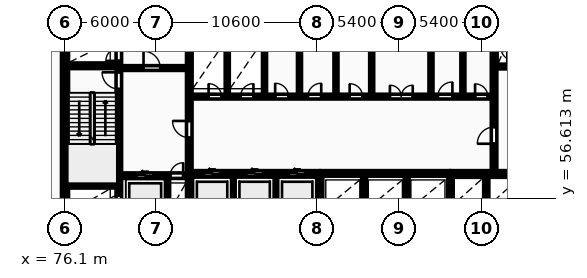
"""IFC4 building model, lengths in metres.
Left out: names, types, materials, properties, quantities, classifications, styles, units other than length and angle.
Written with IfcOpenShell. Run it as: python <this file> out.ifc"""

import sys

from ifc_helpers import new_model, si_unit, direction, frame, frame_2d, origin, place, context, subcontext, project, spatial, rectangle, extrude, element, fill, save


model = new_model("IFC4")
c1 = context("Model", 3, precision=1e-05, world=origin(), true_north=direction((0.0, 1.0)))
c2 = subcontext(c1, "Body", "Model", "MODEL_VIEW")
j1 = project(units=[si_unit("LENGTHUNIT", "METRE"), si_unit("PLANEANGLEUNIT", "RADIAN")], contexts=[c1])
p1 = place(None, origin())
s1 = spatial("IfcSite", under=j1, at=p1, CompositionType="ELEMENT")
p2 = place(p1, origin())
s2 = spatial("IfcBuilding", under=s1, at=p2, CompositionType="ELEMENT")
p3 = place(p2, frame((0.0, 0.0, 5.4)))
s3 = spatial("IfcBuildingStorey", under=s2, at=p3, CompositionType="ELEMENT", Elevation=5.4)
p4 = place(p3, frame((76.125, 55.375, 0.0), z_axis=(0.0, 0.0, 1.0), x_axis=(0.0, 1.0, 0.0)))
e1 = element("IfcWall", 1, at=p4, inside=s3, PredefinedType="SHEAR", context=c2, shape_type="SweptSolid", body=[
    extrude(rectangle(XDim=11.65, YDim=0.35, at=frame_2d((5.825, 0.0))), origin(), (0.0, 0.0, 1.0), 4.6),
])
p5 = place(p3, frame((79.665, 55.4, 0.0), z_axis=(0.0, 0.0, 1.0), x_axis=(0.0, 1.0, 0.0)))
e2 = element("IfcWall", 2, at=p5, inside=s3, PredefinedType="SHEAR", context=c2, shape_type="SweptSolid", body=[
    extrude(rectangle(XDim=11.6, YDim=0.25, at=frame_2d((5.8, 0.0))), origin(), (0.0, 0.0, 1.0), 4.6),
])
p6 = place(p5, frame((0.55, 0.0, 0.0)))
e3 = element("IfcOpeningElement", 3, at=p6, cuts=e2, PredefinedType="OPENING", context=c2, shape_type="SweptSolid", body=[
    extrude(rectangle(XDim=0.85, YDim=2.05, at=frame_2d((0.425, 1.025))), frame((0.0, 0.135, 0.0), z_axis=(0.0, -1.0, 0.0), x_axis=(1.0, 0.0, 0.0)), (0.0, 0.0, 1.0), 0.27),
])
p7 = place(p5, frame((8.4, 0.0, 0.0)))
e4 = element("IfcOpeningElement", 4, at=p7, cuts=e2, PredefinedType="OPENING", context=c2, shape_type="SweptSolid", body=[
    extrude(rectangle(XDim=1.1, YDim=2.1, at=frame_2d((0.55, 1.05))), frame((0.0, 0.135, 0.0), z_axis=(0.0, -1.0, 0.0), x_axis=(1.0, 0.0, 0.0)), (0.0, 0.0, 1.0), 0.27),
])
p8 = place(p5, frame((10.25, 0.0, 0.0)))
e5 = element("IfcOpeningElement", 5, at=p8, cuts=e2, PredefinedType="OPENING", context=c2, shape_type="SweptSolid", body=[
    extrude(rectangle(XDim=0.85, YDim=2.05, at=frame_2d((0.425, 1.025))), frame((0.0, 0.135, 0.0), z_axis=(0.0, -1.0, 0.0), x_axis=(1.0, 0.0, 0.0)), (0.0, 0.0, 1.0), 0.27),
])
for number, where, z_axis, x_axis in (
    (6, (76.3, 57.475, 0.0), (0.0, 0.0, 1.0), (1.0, 0.0, 0.0)),
    (7, (76.3, 65.325, 0.0), (0.0, 0.0, 1.0), (1.0, 0.0, 0.0)),
):
    element("IfcWall", number, at=place(p3, frame(where, z_axis=z_axis, x_axis=x_axis)), inside=s3, PredefinedType="SHEAR", context=c2, shape_type="SweptSolid", body=[
        extrude(rectangle(XDim=3.24, YDim=0.25, at=frame_2d((1.62, 0.0))), origin(), (0.0, 0.0, 1.0), 4.6),
    ])
p9 = place(p3, frame((79.79, 58.1, 0.0), z_axis=(0.0, 0.0, 1.0), x_axis=(1.0, 0.0, 0.0)))
e8 = element("IfcWall", 8, at=p9, inside=s3, PredefinedType="SHEAR", context=c2, shape_type="SweptSolid", body=[
    extrude(rectangle(XDim=4.39, YDim=0.25, at=frame_2d((2.195, 0.0))), origin(), (0.0, 0.0, 1.0), 4.6),
])
p10 = place(p9, frame((1.05, 0.0, 0.0)))
e9 = element("IfcOpeningElement", 9, at=p10, cuts=e8, PredefinedType="OPENING", context=c2, shape_type="SweptSolid", body=[
    extrude(rectangle(XDim=1.12, YDim=2.12, at=frame_2d((0.56, 1.06))), frame((0.0, 0.135, 0.0), z_axis=(0.0, -1.0, 0.0), x_axis=(1.0, 0.0, 0.0)), (0.0, 0.0, 1.0), 0.27),
])
p11 = place(p9, frame((3.26, 0.0, 0.0)))
e10 = element("IfcOpeningElement", 10, at=p11, cuts=e8, PredefinedType="OPENING", context=c2, shape_type="SweptSolid", body=[
    extrude(rectangle(XDim=0.85, YDim=2.05, at=frame_2d((0.425, 1.025))), frame((0.0, 0.135, 0.0), z_axis=(0.0, -1.0, 0.0), x_axis=(1.0, 0.0, 0.0)), (0.0, 0.0, 1.0), 0.27),
])
p12 = place(p3, frame((82.85, 55.4, 0.0), z_axis=(0.0, 0.0, 1.0), x_axis=(0.0, 1.0, 0.0)))
e11 = element("IfcWall", 11, at=p12, inside=s3, PredefinedType="PARTITIONING", context=c2, shape_type="SweptSolid", body=[
    extrude(rectangle(XDim=2.56, YDim=0.2, at=frame_2d((1.28, 0.0))), origin(), (0.0, 0.0, 1.0), 4.3),
])
p13 = place(p3, frame((79.79, 65.18, 0.0), z_axis=(0.0, 0.0, 1.0), x_axis=(1.0, 0.0, 0.0)))
e12 = element("IfcWall", 12, at=p13, inside=s3, PredefinedType="PARTITIONING", context=c2, shape_type="SweptSolid", body=[
    extrude(rectangle(XDim=4.39, YDim=0.2, at=frame_2d((2.195, 0.0))), origin(), (0.0, 0.0, 1.0), 4.3),
])
p14 = place(p13, frame((1.5, 0.0, 0.0)))
e13 = element("IfcOpeningElement", 13, at=p14, cuts=e12, PredefinedType="OPENING", context=c2, shape_type="SweptSolid", body=[
    extrude(rectangle(XDim=1.1, YDim=2.1, at=frame_2d((0.55, 1.05))), frame((0.0, 0.11, 0.0), z_axis=(0.0, -1.0, 0.0), x_axis=(1.0, 0.0, 0.0)), (0.0, 0.0, 1.0), 0.22),
])
p15 = place(p3, frame((84.3, 55.4, 0.0), z_axis=(0.0, 0.0, 1.0), x_axis=(0.0, 1.0, 0.0)))
e14 = element("IfcWall", 14, at=p15, inside=s3, PredefinedType="SHEAR", context=c2, shape_type="SweptSolid", body=[
    extrude(rectangle(XDim=11.6, YDim=0.25, at=frame_2d((5.8, 0.0))), origin(), (0.0, 0.0, 1.0), 4.6),
])
p16 = place(p15, frame((5.2, 0.0, 0.0)))
e15 = element("IfcOpeningElement", 15, at=p16, cuts=e14, PredefinedType="OPENING", context=c2, shape_type="SweptSolid", body=[
    extrude(rectangle(XDim=1.1, YDim=2.1, at=frame_2d((0.55, 1.05))), frame((0.0, 0.135, 0.0), z_axis=(0.0, -1.0, 0.0), x_axis=(1.0, 0.0, 0.0)), (0.0, 0.0, 1.0), 0.27),
])
for number, where, z_axis, x_axis in (
    (16, (87.2, 55.4, 0.0), (0.0, 0.0, 1.0), (0.0, 1.0, 0.0)),
    (17, (90.0, 55.4, 0.0), (0.0, 0.0, 1.0), (0.0, 1.0, 0.0)),
):
    element("IfcWall", number, at=place(p3, frame(where, z_axis=z_axis, x_axis=x_axis)), inside=s3, PredefinedType="PARTITIONING", context=c2, shape_type="SweptSolid", body=[
        extrude(rectangle(XDim=2.72, YDim=0.2, at=frame_2d((1.36, 0.0))), origin(), (0.0, 0.0, 1.0), 4.3),
    ])
p17 = place(p3, frame((84.42, 58.25, 0.0), z_axis=(0.0, 0.0, 1.0), x_axis=(1.0, 0.0, 0.0)))
e18 = element("IfcWall", 18, at=p17, inside=s3, PredefinedType="SHEAR", context=c2, shape_type="SweptSolid", body=[
    extrude(rectangle(XDim=8.36, YDim=0.25, at=frame_2d((4.18, 0.0))), origin(), (0.0, 0.0, 1.0), 4.6),
])
p18 = place(p17, frame((0.82, 0.0, 0.0)))
e19 = element("IfcOpeningElement", 19, at=p18, cuts=e18, PredefinedType="OPENING", context=c2, shape_type="SweptSolid", body=[
    extrude(rectangle(XDim=1.12, YDim=2.12, at=frame_2d((0.56, 1.06))), frame((0.0, 0.135, 0.0), z_axis=(0.0, -1.0, 0.0), x_axis=(1.0, 0.0, 0.0)), (0.0, 0.0, 1.0), 0.27),
])
p19 = place(p17, frame((3.62, 0.0, 0.0)))
e20 = element("IfcOpeningElement", 20, at=p19, cuts=e18, PredefinedType="OPENING", context=c2, shape_type="SweptSolid", body=[
    extrude(rectangle(XDim=1.12, YDim=2.12, at=frame_2d((0.56, 1.06))), frame((0.0, 0.135, 0.0), z_axis=(0.0, -1.0, 0.0), x_axis=(1.0, 0.0, 0.0)), (0.0, 0.0, 1.0), 0.27),
])
p20 = place(p17, frame((6.42, 0.0, 0.0)))
e21 = element("IfcOpeningElement", 21, at=p20, cuts=e18, PredefinedType="OPENING", context=c2, shape_type="SweptSolid", body=[
    extrude(rectangle(XDim=1.12, YDim=2.12, at=frame_2d((0.56, 1.06))), frame((0.0, 0.135, 0.0), z_axis=(0.0, -1.0, 0.0), x_axis=(1.0, 0.0, 0.0)), (0.0, 0.0, 1.0), 0.27),
])
p21 = place(p3, frame((92.9, 55.4, 0.0), z_axis=(0.0, 0.0, 1.0), x_axis=(0.0, 1.0, 0.0)))
e22 = element("IfcWall", 22, at=p21, inside=s3, PredefinedType="SHEAR", context=c2, shape_type="SweptSolid", body=[
    extrude(rectangle(XDim=2.85, YDim=0.25, at=frame_2d((1.425, 0.0))), origin(), (0.0, 0.0, 1.0), 4.6),
])
for number, where, z_axis, x_axis in (
    (23, (95.8, 55.4, 0.0), (0.0, 0.0, 1.0), (0.0, 1.0, 0.0)),
    (24, (98.6, 55.4, 0.0), (0.0, 0.0, 1.0), (0.0, 1.0, 0.0)),
):
    element("IfcWall", number, at=place(p3, frame(where, z_axis=z_axis, x_axis=x_axis)), inside=s3, PredefinedType="PARTITIONING", context=c2, shape_type="SweptSolid", body=[
        extrude(rectangle(XDim=2.72, YDim=0.2, at=frame_2d((1.36, 0.0))), origin(), (0.0, 0.0, 1.0), 4.3),
    ])
p22 = place(p3, frame((93.02, 58.25, 0.0), z_axis=(0.0, 0.0, 1.0), x_axis=(1.0, 0.0, 0.0)))
e25 = element("IfcWall", 25, at=p22, inside=s3, PredefinedType="SHEAR", context=c2, shape_type="SweptSolid", body=[
    extrude(rectangle(XDim=8.36, YDim=0.25, at=frame_2d((4.18, 0.0))), origin(), (0.0, 0.0, 1.0), 4.6),
])
p23 = place(p3, frame((101.48, 55.4, 0.0), z_axis=(0.0, 0.0, 1.0), x_axis=(0.0, 1.0, 0.0)))
e26 = element("IfcWall", 26, at=p23, inside=s3, PredefinedType="SHEAR", context=c2, shape_type="SweptSolid", body=[
    extrude(rectangle(XDim=2.85, YDim=0.25, at=frame_2d((1.425, 0.0))), origin(), (0.0, 0.0, 1.0), 4.6),
])
p24 = place(p3, frame((103.85, 55.4, 0.0), z_axis=(0.0, 0.0, 1.0), x_axis=(0.0, 1.0, 0.0)))
e27 = element("IfcWall", 27, at=p24, inside=s3, PredefinedType="PARTITIONING", context=c2, shape_type="SweptSolid", body=[
    extrude(rectangle(XDim=2.72, YDim=0.2, at=frame_2d((1.36, 0.0))), origin(), (0.0, 0.0, 1.0), 4.3),
])
p25 = place(p3, frame((101.55, 58.25, 0.0), z_axis=(0.0, 0.0, 1.0), x_axis=(1.0, 0.0, 0.0)))
e28 = element("IfcWall", 28, at=p25, inside=s3, PredefinedType="SHEAR", context=c2, shape_type="SweptSolid", body=[
    extrude(rectangle(XDim=4.6, YDim=0.25, at=frame_2d((2.3, 0.0))), origin(), (0.0, 0.0, 1.0), 4.6),
])
for number, where, z_axis, x_axis in (
    (29, (86.8, 63.4, 0.0), (0.0, 0.0, 1.0), (0.0, 1.0, 0.0)),
    (30, (89.25, 63.4, 0.0), (0.0, 0.0, 1.0), (0.0, 1.0, 0.0)),
    (31, (91.55, 63.4, 0.0), (0.0, 0.0, 1.0), (0.0, 1.0, 0.0)),
):
    element("IfcWall", number, at=place(p3, frame(where, z_axis=z_axis, x_axis=x_axis)), inside=s3, PredefinedType="PARTITIONING", context=c2, shape_type="SweptSolid", body=[
        extrude(rectangle(XDim=3.6, YDim=0.15, at=frame_2d((1.8, 0.0))), origin(), (0.0, 0.0, 1.0), 4.3),
    ])
p26 = place(p3, frame((93.95, 63.4, 0.0), z_axis=(0.0, 0.0, 1.0), x_axis=(0.0, 1.0, 0.0)))
e32 = element("IfcWall", 32, at=p26, inside=s3, PredefinedType="PARTITIONING", context=c2, shape_type="SweptSolid", body=[
    extrude(rectangle(XDim=3.6, YDim=0.15, at=frame_2d((1.8, 0.0))), origin(), (0.0, 0.0, 1.0), 3.55),
])
for number, where, z_axis, x_axis in (
    (33, (102.3, 63.4, 0.0), (0.0, 0.0, 1.0), (0.0, 1.0, 0.0)),
    (34, (96.3, 63.4, 0.0), (0.0, 0.0, 1.0), (0.0, 1.0, 0.0)),
    (35, (100.2, 63.4, 0.0), (0.0, 0.0, 1.0), (0.0, 1.0, 0.0)),
):
    element("IfcWall", number, at=place(p3, frame(where, z_axis=z_axis, x_axis=x_axis)), inside=s3, PredefinedType="PARTITIONING", context=c2, shape_type="SweptSolid", body=[
        extrude(rectangle(XDim=3.6, YDim=0.15, at=frame_2d((1.8, 0.0))), origin(), (0.0, 0.0, 1.0), 4.3),
    ])
p27 = place(p3, frame((84.42, 63.3, 0.0), z_axis=(0.0, 0.0, 1.0), x_axis=(1.0, 0.0, 0.0)))
e36 = element("IfcWall", 36, at=p27, inside=s3, PredefinedType="PARTITIONING", context=c2, shape_type="SweptSolid", body=[
    extrude(rectangle(XDim=19.83, YDim=0.2, at=frame_2d((9.915, 0.0))), origin(), (0.0, 0.0, 1.0), 4.3),
])
p28 = place(p27, frame((1.15, 0.0, 0.0)))
e37 = element("IfcOpeningElement", 37, at=p28, cuts=e36, PredefinedType="OPENING", context=c2, shape_type="SweptSolid", body=[
    extrude(rectangle(XDim=0.85, YDim=2.05, at=frame_2d((0.425, 1.025))), frame((0.0, 0.11, 0.0), z_axis=(0.0, -1.0, 0.0), x_axis=(1.0, 0.0, 0.0)), (0.0, 0.0, 1.0), 0.22),
])
p29 = place(p27, frame((3.25, 0.0, 0.0)))
e38 = element("IfcOpeningElement", 38, at=p29, cuts=e36, PredefinedType="OPENING", context=c2, shape_type="SweptSolid", body=[
    extrude(rectangle(XDim=0.85, YDim=2.05, at=frame_2d((0.425, 1.025))), frame((0.0, 0.11, 0.0), z_axis=(0.0, -1.0, 0.0), x_axis=(1.0, 0.0, 0.0)), (0.0, 0.0, 1.0), 0.22),
])
p30 = place(p27, frame((13.08, 0.0, 0.0)))
e39 = element("IfcOpeningElement", 39, at=p30, cuts=e36, PredefinedType="OPENING", context=c2, shape_type="SweptSolid", body=[
    extrude(rectangle(XDim=1.5, YDim=2.2, at=frame_2d((0.75, 1.1))), frame((0.0, 0.11, 0.0), z_axis=(0.0, -1.0, 0.0), x_axis=(1.0, 0.0, 0.0)), (0.0, 0.0, 1.0), 0.22),
])
p31 = place(p27, frame((5.53, 0.0, 0.0)))
e40 = element("IfcOpeningElement", 40, at=p31, cuts=e36, PredefinedType="OPENING", context=c2, shape_type="SweptSolid", body=[
    extrude(rectangle(XDim=0.88, YDim=2.06, at=frame_2d((0.44, 1.03))), frame((0.0, 0.11, 0.0), z_axis=(0.0, -1.0, 0.0), x_axis=(1.0, 0.0, 0.0)), (0.0, 0.0, 1.0), 0.22),
])
p32 = place(p27, frame((7.68, 0.0, 0.0)))
e41 = element("IfcOpeningElement", 41, at=p32, cuts=e36, PredefinedType="OPENING", context=c2, shape_type="SweptSolid", body=[
    extrude(rectangle(XDim=0.88, YDim=2.06, at=frame_2d((0.44, 1.03))), frame((0.0, 0.11, 0.0), z_axis=(0.0, -1.0, 0.0), x_axis=(1.0, 0.0, 0.0)), (0.0, 0.0, 1.0), 0.22),
])
p33 = place(p27, frame((10.43, 0.0, 0.0)))
e42 = element("IfcOpeningElement", 42, at=p33, cuts=e36, PredefinedType="OPENING", context=c2, shape_type="SweptSolid", body=[
    extrude(rectangle(XDim=0.85, YDim=2.05, at=frame_2d((0.425, 1.025))), frame((0.0, 0.11, 0.0), z_axis=(0.0, -1.0, 0.0), x_axis=(1.0, 0.0, 0.0)), (0.0, 0.0, 1.0), 0.22),
])
p34 = place(p27, frame((16.23, 0.0, 0.0)))
e43 = element("IfcOpeningElement", 43, at=p34, cuts=e36, PredefinedType="OPENING", context=c2, shape_type="SweptSolid", body=[
    extrude(rectangle(XDim=0.96, YDim=2.1, at=frame_2d((0.48, 1.05))), frame((0.0, 0.11, 0.0), z_axis=(0.0, -1.0, 0.0), x_axis=(1.0, 0.0, 0.0)), (0.0, 0.0, 1.0), 0.22),
])
p35 = place(p27, frame((18.68, 0.0, 0.0)))
e44 = element("IfcOpeningElement", 44, at=p35, cuts=e36, PredefinedType="OPENING", context=c2, shape_type="SweptSolid", body=[
    extrude(rectangle(XDim=0.84, YDim=2.04, at=frame_2d((0.42, 1.02))), frame((0.0, 0.11, 0.0), z_axis=(0.0, -1.0, 0.0), x_axis=(1.0, 0.0, 0.0)), (0.0, 0.0, 1.0), 0.22),
])
p36 = place(p3, frame((104.45, 65.28, 0.0), z_axis=(0.0, 0.0, 1.0), x_axis=(1.0, 0.0, 0.0)))
e45 = element("IfcWall", 45, at=p36, inside=s3, PredefinedType="PARTITIONING", context=c2, shape_type="SweptSolid", body=[
    extrude(rectangle(XDim=1.2, YDim=0.2, at=frame_2d((0.6, 0.0))), origin(), (0.0, 0.0, 1.0), 4.3),
])
p37 = place(p3, frame((104.35, 58.4, 0.0), z_axis=(0.0, 0.0, 1.0), x_axis=(0.0, 1.0, 0.0)))
e46 = element("IfcWall", 46, at=p37, inside=s3, PredefinedType="SHEAR", context=c2, shape_type="SweptSolid", body=[
    extrude(rectangle(XDim=8.6, YDim=0.25, at=frame_2d((4.3, 0.0))), origin(), (0.0, 0.0, 1.0), 4.6),
])
p38 = place(p37, frame((1.8, 0.0, 0.0)))
e47 = element("IfcOpeningElement", 47, at=p38, cuts=e46, PredefinedType="OPENING", context=c2, shape_type="SweptSolid", body=[
    extrude(rectangle(XDim=1.1, YDim=2.1, at=frame_2d((0.55, 1.05))), frame((0.0, 0.135, 0.0), z_axis=(0.0, -1.0, 0.0), x_axis=(1.0, 0.0, 0.0)), (0.0, 0.0, 1.0), 0.27),
])
p39 = place(p6, origin())
e48 = element("IfcDoor", 48, at=p39, inside=s3, OperationType="SINGLE_SWING_LEFT", PredefinedType="DOOR", context=c2, shape_type="SweptSolid", body=[
    extrude(rectangle(XDim=0.85, YDim=2.05, at=frame_2d((0.425, 1.025))), frame((0.0, 0.025, 0.0), z_axis=(0.0, -1.0, 0.0), x_axis=(1.0, 0.0, 0.0)), (0.0, 0.0, 1.0), 0.05),
])
fill(e3, e48)
p40 = place(p7, origin())
e49 = element("IfcDoor", 49, at=p40, inside=s3, OperationType="SINGLE_SWING_RIGHT", PredefinedType="DOOR", context=c2, shape_type="SweptSolid", body=[
    extrude(rectangle(XDim=1.1, YDim=2.1, at=frame_2d((0.55, 1.05))), frame((0.0, 0.025, 0.0), z_axis=(0.0, -1.0, 0.0), x_axis=(1.0, 0.0, 0.0)), (0.0, 0.0, 1.0), 0.05),
])
fill(e4, e49)
p41 = place(p8, origin())
e50 = element("IfcDoor", 50, at=p41, inside=s3, OperationType="SINGLE_SWING_LEFT", PredefinedType="DOOR", context=c2, shape_type="SweptSolid", body=[
    extrude(rectangle(XDim=0.85, YDim=2.05, at=frame_2d((0.425, 1.025))), frame((0.0, 0.025, 0.0), z_axis=(0.0, -1.0, 0.0), x_axis=(1.0, 0.0, 0.0)), (0.0, 0.0, 1.0), 0.05),
])
fill(e5, e50)
p42 = place(p10, origin())
e51 = element("IfcDoor", 51, at=p42, inside=s3, OperationType="SLIDING_TO_LEFT", PredefinedType="DOOR", context=c2, shape_type="SweptSolid", body=[
    extrude(rectangle(XDim=1.12, YDim=2.12, at=frame_2d((0.56, 1.06))), frame((0.0, 0.025, 0.0), z_axis=(0.0, -1.0, 0.0), x_axis=(1.0, 0.0, 0.0)), (0.0, 0.0, 1.0), 0.05),
])
fill(e9, e51)
p43 = place(p11, origin())
e52 = element("IfcDoor", 52, at=p43, inside=s3, OperationType="SINGLE_SWING_RIGHT", PredefinedType="DOOR", context=c2, shape_type="SweptSolid", body=[
    extrude(rectangle(XDim=0.85, YDim=2.05, at=frame_2d((0.425, 1.025))), frame((0.0, 0.025, 0.0), z_axis=(0.0, -1.0, 0.0), x_axis=(1.0, 0.0, 0.0)), (0.0, 0.0, 1.0), 0.05),
])
fill(e10, e52)
p44 = place(p14, origin())
e53 = element("IfcDoor", 53, at=p44, inside=s3, OperationType="SINGLE_SWING_LEFT", PredefinedType="DOOR", context=c2, shape_type="SweptSolid", body=[
    extrude(rectangle(XDim=1.1, YDim=2.1, at=frame_2d((0.55, 1.05))), frame((0.0, 0.025, 0.0), z_axis=(0.0, -1.0, 0.0), x_axis=(1.0, 0.0, 0.0)), (0.0, 0.0, 1.0), 0.05),
])
fill(e13, e53)
p45 = place(p16, origin())
e54 = element("IfcDoor", 54, at=p45, inside=s3, OperationType="SINGLE_SWING_RIGHT", PredefinedType="DOOR", context=c2, shape_type="SweptSolid", body=[
    extrude(rectangle(XDim=1.1, YDim=2.1, at=frame_2d((0.55, 1.05))), frame((0.0, 0.025, 0.0), z_axis=(0.0, -1.0, 0.0), x_axis=(1.0, 0.0, 0.0)), (0.0, 0.0, 1.0), 0.05),
])
fill(e15, e54)
p46 = place(p18, origin())
e55 = element("IfcDoor", 55, at=p46, inside=s3, OperationType="SLIDING_TO_LEFT", PredefinedType="DOOR", context=c2, shape_type="SweptSolid", body=[
    extrude(rectangle(XDim=1.12, YDim=2.12, at=frame_2d((0.56, 1.06))), frame((0.0, 0.025, 0.0), z_axis=(0.0, -1.0, 0.0), x_axis=(1.0, 0.0, 0.0)), (0.0, 0.0, 1.0), 0.05),
])
fill(e19, e55)
p47 = place(p19, origin())
e56 = element("IfcDoor", 56, at=p47, inside=s3, OperationType="SLIDING_TO_LEFT", PredefinedType="DOOR", context=c2, shape_type="SweptSolid", body=[
    extrude(rectangle(XDim=1.12, YDim=2.12, at=frame_2d((0.56, 1.06))), frame((0.0, 0.025, 0.0), z_axis=(0.0, -1.0, 0.0), x_axis=(1.0, 0.0, 0.0)), (0.0, 0.0, 1.0), 0.05),
])
fill(e20, e56)
p48 = place(p20, origin())
e57 = element("IfcDoor", 57, at=p48, inside=s3, OperationType="SLIDING_TO_LEFT", PredefinedType="DOOR", context=c2, shape_type="SweptSolid", body=[
    extrude(rectangle(XDim=1.12, YDim=2.12, at=frame_2d((0.56, 1.06))), frame((0.0, 0.025, 0.0), z_axis=(0.0, -1.0, 0.0), x_axis=(1.0, 0.0, 0.0)), (0.0, 0.0, 1.0), 0.05),
])
fill(e21, e57)
p49 = place(p28, origin())
e58 = element("IfcDoor", 58, at=p49, inside=s3, OperationType="SINGLE_SWING_LEFT", PredefinedType="DOOR", context=c2, shape_type="SweptSolid", body=[
    extrude(rectangle(XDim=0.85, YDim=2.05, at=frame_2d((0.425, 1.025))), frame((0.0, 0.025, 0.0), z_axis=(0.0, -1.0, 0.0), x_axis=(1.0, 0.0, 0.0)), (0.0, 0.0, 1.0), 0.05),
])
fill(e37, e58)
p50 = place(p29, origin())
e59 = element("IfcDoor", 59, at=p50, inside=s3, OperationType="SINGLE_SWING_RIGHT", PredefinedType="DOOR", context=c2, shape_type="SweptSolid", body=[
    extrude(rectangle(XDim=0.85, YDim=2.05, at=frame_2d((0.425, 1.025))), frame((0.0, 0.025, 0.0), z_axis=(0.0, -1.0, 0.0), x_axis=(1.0, 0.0, 0.0)), (0.0, 0.0, 1.0), 0.05),
])
fill(e38, e59)
p51 = place(p30, origin())
e60 = element("IfcDoor", 60, at=p51, inside=s3, OperationType="DOUBLE_DOOR_SINGLE_SWING", PredefinedType="DOOR", context=c2, shape_type="SweptSolid", body=[
    extrude(rectangle(XDim=1.5, YDim=2.2, at=frame_2d((0.75, 1.1))), frame((0.0, 0.025, 0.0), z_axis=(0.0, -1.0, 0.0), x_axis=(1.0, 0.0, 0.0)), (0.0, 0.0, 1.0), 0.05),
])
fill(e39, e60)
p52 = place(p31, origin())
e61 = element("IfcDoor", 61, at=p52, inside=s3, OperationType="SINGLE_SWING_LEFT", PredefinedType="DOOR", context=c2, shape_type="SweptSolid", body=[
    extrude(rectangle(XDim=0.88, YDim=2.06, at=frame_2d((0.44, 1.03))), frame((0.0, 0.025, 0.0), z_axis=(0.0, -1.0, 0.0), x_axis=(1.0, 0.0, 0.0)), (0.0, 0.0, 1.0), 0.05),
])
fill(e40, e61)
p53 = place(p32, origin())
e62 = element("IfcDoor", 62, at=p53, inside=s3, OperationType="SINGLE_SWING_RIGHT", PredefinedType="DOOR", context=c2, shape_type="SweptSolid", body=[
    extrude(rectangle(XDim=0.88, YDim=2.06, at=frame_2d((0.44, 1.03))), frame((0.0, 0.025, 0.0), z_axis=(0.0, -1.0, 0.0), x_axis=(1.0, 0.0, 0.0)), (0.0, 0.0, 1.0), 0.05),
])
fill(e41, e62)
p54 = place(p33, origin())
e63 = element("IfcDoor", 63, at=p54, inside=s3, OperationType="SINGLE_SWING_LEFT", PredefinedType="DOOR", context=c2, shape_type="SweptSolid", body=[
    extrude(rectangle(XDim=0.85, YDim=2.05, at=frame_2d((0.425, 1.025))), frame((0.0, 0.025, 0.0), z_axis=(0.0, -1.0, 0.0), x_axis=(1.0, 0.0, 0.0)), (0.0, 0.0, 1.0), 0.05),
])
fill(e42, e63)
p55 = place(p34, origin())
e64 = element("IfcDoor", 64, at=p55, inside=s3, OperationType="SINGLE_SWING_RIGHT", PredefinedType="DOOR", context=c2, shape_type="SweptSolid", body=[
    extrude(rectangle(XDim=0.96, YDim=2.1, at=frame_2d((0.48, 1.05))), frame((0.0, 0.025, 0.0), z_axis=(0.0, -1.0, 0.0), x_axis=(1.0, 0.0, 0.0)), (0.0, 0.0, 1.0), 0.05),
])
fill(e43, e64)
p56 = place(p35, origin())
e65 = element("IfcDoor", 65, at=p56, inside=s3, OperationType="SINGLE_SWING_LEFT", PredefinedType="DOOR", context=c2, shape_type="SweptSolid", body=[
    extrude(rectangle(XDim=0.84, YDim=2.04, at=frame_2d((0.42, 1.02))), frame((0.0, 0.025, 0.0), z_axis=(0.0, -1.0, 0.0), x_axis=(1.0, 0.0, 0.0)), (0.0, 0.0, 1.0), 0.05),
])
fill(e44, e65)
p57 = place(p38, origin())
e66 = element("IfcDoor", 66, at=p57, inside=s3, OperationType="SINGLE_SWING_LEFT", PredefinedType="DOOR", context=c2, shape_type="SweptSolid", body=[
    extrude(rectangle(XDim=1.1, YDim=2.1, at=frame_2d((0.55, 1.05))), frame((0.0, 0.025, 0.0), z_axis=(0.0, -1.0, 0.0), x_axis=(1.0, 0.0, 0.0)), (0.0, 0.0, 1.0), 0.05),
])
fill(e47, e66)
save(model, sys.argv[1])
